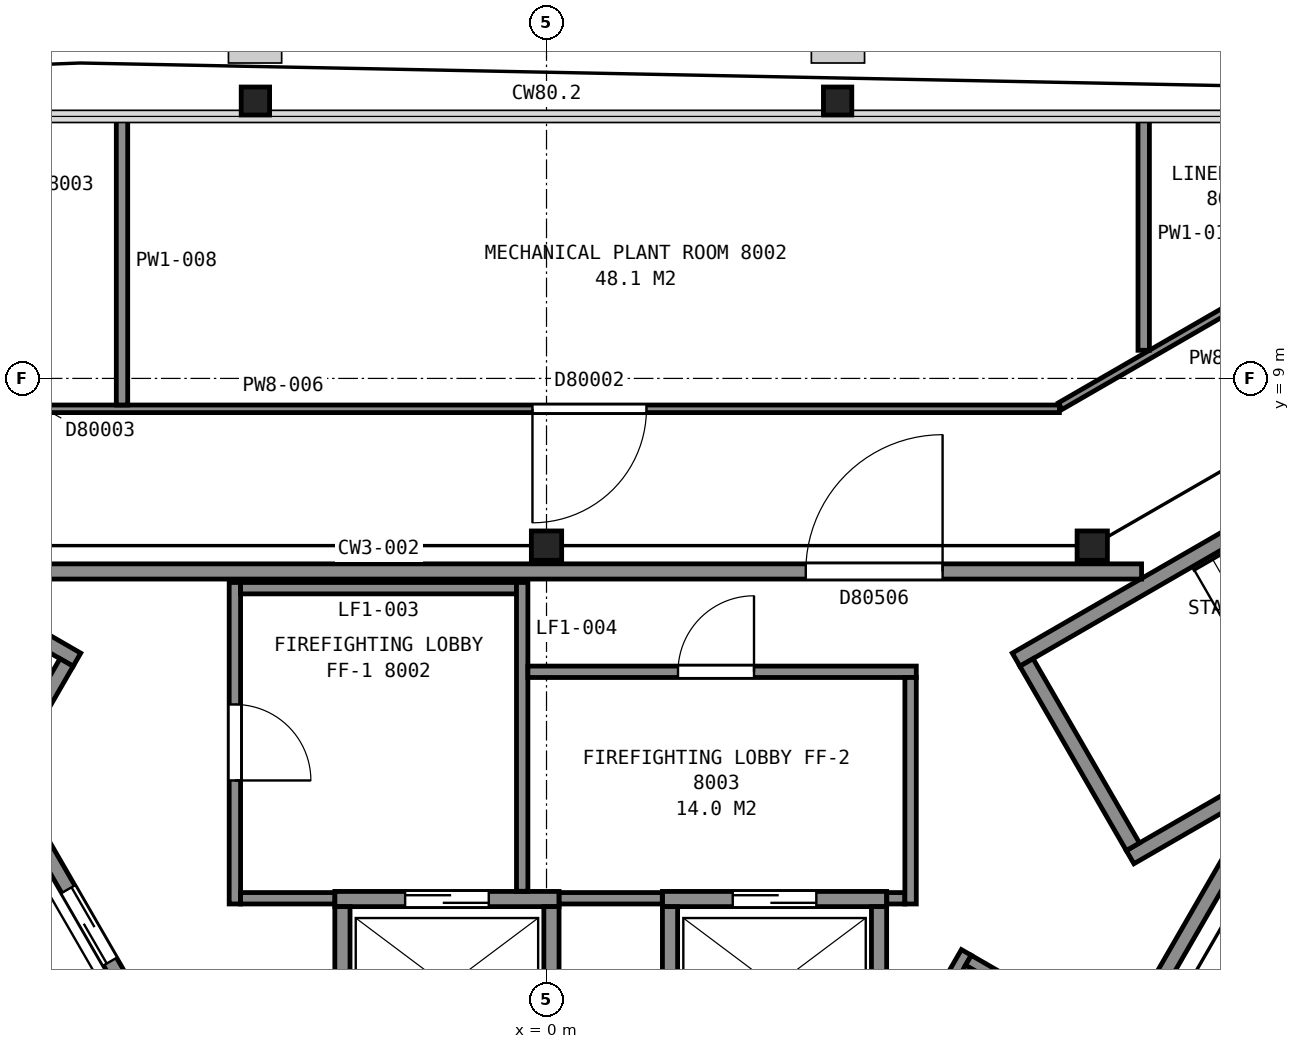
"""IFC4 building model, lengths in metres.
Left out: names, types, materials, properties, quantities, classifications, styles, units other than length and angle.
Written with IfcOpenShell. Run it as: python <this file> out.ifc"""

import sys

from ifc_helpers import new_model, si_unit, direction, frame, frame_2d, origin, origin_2d, place, context, subcontext, project, spatial, rectangle, i_section, extrude, element, fill, save


model = new_model("IFC4")
c1 = context("Model", 3, precision=1e-05, world=origin(), true_north=direction((0.0, 1.0)))
c2 = subcontext(c1, "Body", "Model", "MODEL_VIEW")
j1 = project(units=[si_unit("LENGTHUNIT", "METRE"), si_unit("PLANEANGLEUNIT", "RADIAN")], contexts=[c1])
p1 = place(None, origin())
s1 = spatial("IfcSite", under=j1, at=p1, CompositionType="ELEMENT")
p2 = place(p1, origin())
s2 = spatial("IfcBuilding", under=s1, at=p2, CompositionType="ELEMENT")
p3 = place(p2, frame((0.0, 0.0, 316.8)))
s3 = spatial("IfcBuildingStorey", under=s2, at=p3, CompositionType="ELEMENT", Elevation=316.8)
for number, where, z_axis, x_axis in (
    (1, (3.83, 12.65, 0.0), (0.0, 0.0, 1.0), (1.0, 0.0, 0.0)),
    (2, (-3.83, 12.65, 0.0), (0.0, 0.0, 1.0), (1.0, 0.0, 0.0)),
):
    element("IfcColumn", number, at=place(p3, frame(where, z_axis=z_axis, x_axis=x_axis)), inside=s3, PredefinedType="COLUMN", context=c2, shape_type="SweptSolid", body=[
        extrude(i_section(OverallWidth=0.373, OverallDepth=0.368, WebThickness=0.015, FlangeThickness=0.024, FilletRadius=0.015, at=origin_2d()), origin(), (0.0, 0.0, 1.0), 4.2),
    ])
for number, where, z_axis, x_axis in (
    (3, (7.18, 6.8, 0.0), (0.0, 0.0, 1.0), (1.0, 0.0, 0.0)),
    (4, (0.0, 6.8, 0.0), (0.0, 0.0, 1.0), (1.0, 0.0, 0.0)),
):
    element("IfcColumn", number, at=place(p3, frame(where, z_axis=z_axis, x_axis=x_axis)), inside=s3, PredefinedType="COLUMN", context=c2, shape_type="SweptSolid", body=[
        extrude(i_section(OverallWidth=0.399, OverallDepth=0.386, WebThickness=0.021, FlangeThickness=0.033, FilletRadius=0.015, at=origin_2d()), origin(), (0.0, 0.0, 1.0), 4.2),
    ])
for number, where, z_axis, x_axis in (
    (5, (6.178, 5.299, 0.0), (0.0, 0.0, 1.0), (0.866, 0.5, 0.0)),
    (6, (7.678, 2.701, 0.0), (0.0, 0.0, 1.0), (0.866, 0.5, 0.0)),
):
    element("IfcWall", number, at=place(p3, frame(where, z_axis=z_axis, x_axis=x_axis)), inside=s3, PredefinedType="PARTITIONING", context=c2, shape_type="SweptSolid", body=[
        extrude(rectangle(XDim=7.2, YDim=0.2, at=frame_2d((3.6, 0.0))), origin(), (0.0, 0.0, 1.0), 3.95),
    ])
p4 = place(p3, frame((7.715, 2.838, 0.0), z_axis=(0.0, 0.0, 1.0), x_axis=(-0.500049511043, 0.865996816683, 0.0)))
e7 = element("IfcWall", 7, at=p4, inside=s3, PredefinedType="PARTITIONING", context=c2, shape_type="SweptSolid", body=[
    extrude(rectangle(XDim=2.8, YDim=0.2, at=frame_2d((1.4, 0.0))), origin(), (0.0, 0.0, 1.0), 3.95),
])
p5 = place(p3, frame((-6.178, 5.299, 0.0), z_axis=(0.0, 0.0, 1.0), x_axis=(-0.866033125095, 0.499986626058, 0.0)))
e8 = element("IfcWall", 8, at=p5, inside=s3, PredefinedType="PARTITIONING", context=c2, shape_type="SweptSolid", body=[
    extrude(rectangle(XDim=7.2, YDim=0.2, at=frame_2d((3.6, 0.0))), origin(), (0.0, 0.0, 1.0), 3.95),
])
p6 = place(p3, frame((-6.315, 5.262, 0.0), z_axis=(0.0, 0.0, 1.0), x_axis=(-0.500049511043, -0.865996816683, 0.0)))
e9 = element("IfcWall", 9, at=p6, inside=s3, PredefinedType="PARTITIONING", context=c2, shape_type="SweptSolid", body=[
    extrude(rectangle(XDim=2.8, YDim=0.2, at=frame_2d((1.4, 0.0))), origin(), (0.0, 0.0, 1.0), 3.95),
])
p7 = place(p3, frame((-2.785, 2.15, 0.0), z_axis=(0.0, 0.0, 1.0), x_axis=(1.0, 0.0, 0.0)))
e10 = element("IfcWall", 10, at=p7, inside=s3, PredefinedType="PARTITIONING", context=c2, shape_type="SweptSolid", body=[
    extrude(rectangle(XDim=2.95, YDim=0.2, at=frame_2d((1.475, 0.0))), origin(), (0.0, 0.0, 1.0), 4.2),
])
p8 = place(p7, frame((0.925, 0.0, 0.0)))
e11 = element("IfcOpeningElement", 11, at=p8, cuts=e10, PredefinedType="OPENING", context=c2, shape_type="SweptSolid", body=[
    extrude(rectangle(XDim=1.1, YDim=2.1, at=frame_2d((0.55, 1.05))), frame((0.0, 0.11, 0.0), z_axis=(0.0, -1.0, 0.0), x_axis=(1.0, 0.0, 0.0)), (0.0, 0.0, 1.0), 0.22),
])
p9 = place(p3, frame((1.525, 2.15, 0.0), z_axis=(0.0, 0.0, 1.0), x_axis=(1.0, 0.0, 0.0)))
e12 = element("IfcWall", 12, at=p9, inside=s3, PredefinedType="PARTITIONING", context=c2, shape_type="SweptSolid", body=[
    extrude(rectangle(XDim=2.95, YDim=0.2, at=frame_2d((1.475, 0.0))), origin(), (0.0, 0.0, 1.0), 4.2),
])
p10 = place(p9, frame((0.925, 0.0, 0.0)))
e13 = element("IfcOpeningElement", 13, at=p10, cuts=e12, PredefinedType="OPENING", context=c2, shape_type="SweptSolid", body=[
    extrude(rectangle(XDim=1.1, YDim=2.1, at=frame_2d((0.55, 1.05))), frame((0.0, 0.11, 0.0), z_axis=(0.0, -1.0, 0.0), x_axis=(1.0, 0.0, 0.0)), (0.0, 0.0, 1.0), 0.22),
])
for number, where, z_axis, x_axis in (
    (14, (4.375, 0.1, 0.0), (0.0, 0.0, 1.0), (0.0, 1.0, 0.0)),
    (15, (1.625, 0.1, 0.0), (0.0, 0.0, 1.0), (0.0, 1.0, 0.0)),
    (16, (0.065, 0.1, 0.0), (0.0, 0.0, 1.0), (0.0, 1.0, 0.0)),
    (17, (-2.685, 0.1, 0.0), (0.0, 0.0, 1.0), (0.0, 1.0, 0.0)),
):
    element("IfcWall", number, at=place(p3, frame(where, z_axis=z_axis, x_axis=x_axis)), inside=s3, PredefinedType="PARTITIONING", context=c2, shape_type="SweptSolid", body=[
        extrude(rectangle(XDim=1.95, YDim=0.2, at=frame_2d((0.975, 0.0))), origin(), (0.0, 0.0, 1.0), 4.2),
    ])
p11 = place(p3, frame((-5.28, 0.525, 0.0), z_axis=(0.0, 0.0, 1.0), x_axis=(-0.500037662692, 0.866003658127, 0.0)))
e18 = element("IfcWall", 18, at=p11, inside=s3, PredefinedType="PARTITIONING", context=c2, shape_type="SweptSolid", body=[
    extrude(rectangle(XDim=2.95, YDim=0.2, at=frame_2d((1.475, 0.0))), origin(), (0.0, 0.0, 1.0), 4.2),
])
p12 = place(p11, frame((0.925, 0.0, 0.0)))
e19 = element("IfcOpeningElement", 19, at=p12, cuts=e18, PredefinedType="OPENING", context=c2, shape_type="SweptSolid", body=[
    extrude(rectangle(XDim=1.1, YDim=2.1, at=frame_2d((0.55, 1.05))), frame((0.0, 0.11, 0.0), z_axis=(0.0, -1.0, 0.0), x_axis=(1.0, 0.0, 0.0)), (0.0, 0.0, 1.0), 0.22),
])
p13 = place(p3, frame((7.829, 6.46, 0.0), z_axis=(0.0, 0.0, 1.0), x_axis=(-1.0, 0.0, 0.0)))
e20 = element("IfcWall", 20, at=p13, inside=s3, PredefinedType="PARTITIONING", context=c2, shape_type="SweptSolid", body=[
    extrude(rectangle(XDim=15.658, YDim=0.2, at=frame_2d((7.829, 0.0))), origin(), (0.0, 0.0, 1.0), 3.95),
])
p14 = place(p13, frame((2.618, 0.0, 0.0)))
e21 = element("IfcOpeningElement", 21, at=p14, cuts=e20, PredefinedType="OPENING", context=c2, shape_type="SweptSolid", body=[
    extrude(rectangle(XDim=1.8, YDim=2.1, at=frame_2d((0.9, 1.05))), frame((0.0, 0.11, 0.0), z_axis=(0.0, -1.0, 0.0), x_axis=(1.0, 0.0, 0.0)), (0.0, 0.0, 1.0), 0.22),
])
p15 = place(p3, frame((-4.1, 2.085, 0.0), z_axis=(0.0, 0.0, 1.0), x_axis=(0.0, 1.0, 0.0)))
e22 = element("IfcWall", 22, at=p15, inside=s3, PredefinedType="PARTITIONING", context=c2, shape_type="SweptSolid", body=[
    extrude(rectangle(XDim=4.23, YDim=0.15, at=frame_2d((2.115, 0.0))), origin(), (0.0, 0.0, 1.0), 3.95),
])
p16 = place(p15, frame((1.625, 0.0, 0.0)))
e23 = element("IfcOpeningElement", 23, at=p16, cuts=e22, PredefinedType="OPENING", context=c2, shape_type="SweptSolid", body=[
    extrude(rectangle(XDim=1.0, YDim=2.1, at=frame_2d((0.5, 1.05))), frame((0.0, 0.085, 0.0), z_axis=(0.0, -1.0, 0.0), x_axis=(1.0, 0.0, 0.0)), (0.0, 0.0, 1.0), 0.17),
])
p17 = place(p3, frame((-4.025, 2.16, 0.0), z_axis=(0.0, 0.0, 1.0), x_axis=(1.0, 0.0, 0.0)))
e24 = element("IfcWall", 24, at=p17, inside=s3, PredefinedType="PARTITIONING", context=c2, shape_type="SweptSolid", body=[
    extrude(rectangle(XDim=1.238, YDim=0.15, at=frame_2d((0.619, 0.0))), origin(), (0.0, 0.0, 1.0), 3.95),
])
p18 = place(p3, frame((-4.025, 6.24, 0.0), z_axis=(0.0, 0.0, 1.0), x_axis=(1.0, 0.0, 0.0)))
e25 = element("IfcWall", 25, at=p18, inside=s3, PredefinedType="PARTITIONING", context=c2, shape_type="SweptSolid", body=[
    extrude(rectangle(XDim=3.63, YDim=0.15, at=frame_2d((1.815, 0.0))), origin(), (0.0, 0.0, 1.0), 3.95),
])
p19 = place(p3, frame((-0.32, 2.252, 0.0), z_axis=(0.0, 0.0, 1.0), x_axis=(0.0, 1.0, 0.0)))
e26 = element("IfcWall", 26, at=p19, inside=s3, PredefinedType="PARTITIONING", context=c2, shape_type="SweptSolid", body=[
    extrude(rectangle(XDim=4.063, YDim=0.15, at=frame_2d((2.031, 0.0))), origin(), (0.0, 0.0, 1.0), 3.95),
])
p20 = place(p3, frame((-0.245, 5.14, 0.0), z_axis=(0.0, 0.0, 1.0), x_axis=(1.0, 0.0, 0.0)))
e27 = element("IfcWall", 27, at=p20, inside=s3, PredefinedType="PARTITIONING", context=c2, shape_type="SweptSolid", body=[
    extrude(rectangle(XDim=5.11, YDim=0.15, at=frame_2d((2.555, 0.0))), origin(), (0.0, 0.0, 1.0), 3.95),
])
p21 = place(p20, frame((1.975, 0.0, 0.0)))
e28 = element("IfcOpeningElement", 28, at=p21, cuts=e27, PredefinedType="OPENING", context=c2, shape_type="SweptSolid", body=[
    extrude(rectangle(XDim=1.0, YDim=2.1, at=frame_2d((0.5, 1.05))), frame((0.0, 0.085, 0.0), z_axis=(0.0, -1.0, 0.0), x_axis=(1.0, 0.0, 0.0)), (0.0, 0.0, 1.0), 0.17),
])
p22 = place(p3, frame((0.167, 2.16, 0.0), z_axis=(0.0, 0.0, 1.0), x_axis=(1.0, 0.0, 0.0)))
e29 = element("IfcWall", 29, at=p22, inside=s3, PredefinedType="PARTITIONING", context=c2, shape_type="SweptSolid", body=[
    extrude(rectangle(XDim=1.356, YDim=0.15, at=frame_2d((0.678, 0.0))), origin(), (0.0, 0.0, 1.0), 3.95),
])
p23 = place(p3, frame((2.552, -8.5, 0.0), z_axis=(0.0, 0.0, 1.0), x_axis=(0.499981156672, 0.866036282712, 0.0)))
e30 = element("IfcWall", 30, at=p23, inside=s3, PredefinedType="PARTITIONING", context=c2, shape_type="SweptSolid", body=[
    extrude(rectangle(XDim=13.915, YDim=0.2, at=frame_2d((6.957, 0.0))), origin(), (0.0, 0.0, 1.0), 3.95),
])
p24 = place(p3, frame((3.448, -2.147, 0.0), z_axis=(0.0, 0.0, 1.0), x_axis=(0.499992353047, 0.86602981871, 0.0)))
e31 = element("IfcWall", 31, at=p24, inside=s3, PredefinedType="PARTITIONING", context=c2, shape_type="SweptSolid", body=[
    extrude(rectangle(XDim=4.15, YDim=0.15, at=frame_2d((2.075, 0.0))), origin(), (0.0, 0.0, 1.0), 3.95),
])
p25 = place(p3, frame((4.477, 2.16, 0.0), z_axis=(0.0, 0.0, 1.0), x_axis=(1.0, 0.0, 0.0)))
e32 = element("IfcWall", 32, at=p25, inside=s3, PredefinedType="PARTITIONING", context=c2, shape_type="SweptSolid", body=[
    extrude(rectangle(XDim=0.238, YDim=0.15, at=frame_2d((0.119, 0.0))), origin(), (0.0, 0.0, 1.0), 3.95),
])
p26 = place(p3, frame((4.79, 2.085, 0.0), z_axis=(0.0, 0.0, 1.0), x_axis=(0.0, 1.0, 0.0)))
e33 = element("IfcWall", 33, at=p26, inside=s3, PredefinedType="PARTITIONING", context=c2, shape_type="SweptSolid", body=[
    extrude(rectangle(XDim=2.98, YDim=0.15, at=frame_2d((1.49, 0.0))), origin(), (0.0, 0.0, 1.0), 3.95),
])
p27 = place(p3, frame((7.477, 0.232, 0.0), z_axis=(0.0, 0.0, 1.0), x_axis=(-0.865944298464, 0.500140452231, 0.0)))
e34 = element("IfcWall", 34, at=p27, inside=s3, PredefinedType="PARTITIONING", context=c2, shape_type="SweptSolid", body=[
    extrude(rectangle(XDim=2.224, YDim=0.15, at=frame_2d((1.112, 0.0))), origin(), (0.0, 0.0, 1.0), 3.95),
])
p28 = place(p27, frame((0.65, 0.0, 0.0)))
e35 = element("IfcOpeningElement", 35, at=p28, cuts=e34, PredefinedType="OPENING", context=c2, shape_type="SweptSolid", body=[
    extrude(rectangle(XDim=0.9, YDim=2.1, at=frame_2d((0.45, 1.05))), frame((0.0, 0.085, 0.0), z_axis=(0.0, -1.0, 0.0), x_axis=(1.0, 0.0, 0.0)), (0.0, 0.0, 1.0), 0.17),
])
p29 = place(p3, frame((-4.075, -10.145, 0.0), z_axis=(0.0, 0.0, 1.0), x_axis=(-0.499912942625, 0.866075660549, 0.0)))
e36 = element("IfcWall", 36, at=p29, inside=s3, PredefinedType="PARTITIONING", context=c2, shape_type="SweptSolid", body=[
    extrude(rectangle(XDim=13.499, YDim=0.1, at=frame_2d((6.749, 0.0))), origin(), (0.0, 0.0, 1.0), 3.297),
])
p30 = place(p29, frame((4.117, 0.0, 0.0)))
e37 = element("IfcOpeningElement", 37, at=p30, cuts=e36, PredefinedType="OPENING", context=c2, shape_type="SweptSolid", body=[
    extrude(rectangle(XDim=1.5, YDim=2.1, at=frame_2d((0.75, 1.05))), frame((0.0, 0.06, 0.0), z_axis=(0.0, -1.0, 0.0), x_axis=(1.0, 0.0, 0.0)), (0.0, 0.0, 1.0), 0.12),
])
p31 = place(p3, frame((-6.748, 8.6, 0.0), z_axis=(0.0, 0.0, 1.0), x_axis=(1.0, 0.0, 0.0)))
e38 = element("IfcWall", 38, at=p31, inside=s3, PredefinedType="PARTITIONING", context=c2, shape_type="SweptSolid", body=[
    extrude(rectangle(XDim=13.496, YDim=0.1, at=frame_2d((6.748, 0.0))), origin(), (0.0, 0.0, 1.0), 3.297),
])
p32 = place(p31, frame((6.563, 0.0, 0.0)))
e39 = element("IfcOpeningElement", 39, at=p32, cuts=e38, PredefinedType="OPENING", context=c2, shape_type="SweptSolid", body=[
    extrude(rectangle(XDim=1.5, YDim=2.1, at=frame_2d((0.75, 1.05))), frame((0.0, 0.06, 0.0), z_axis=(0.0, -1.0, 0.0), x_axis=(1.0, 0.0, 0.0)), (0.0, 0.0, 1.0), 0.12),
])
p33 = place(p3, frame((-5.585, 8.65, 0.0), z_axis=(0.0, 0.0, 1.0), x_axis=(0.0, 1.0, 0.0)))
e40 = element("IfcWall", 40, at=p33, inside=s3, PredefinedType="PARTITIONING", context=c2, shape_type="SweptSolid", body=[
    extrude(rectangle(XDim=3.783, YDim=0.15, at=frame_2d((1.892, 0.0))), origin(), (0.0, 0.0, 1.0), 3.297),
])
p34 = place(p3, frame((4.075, -10.145, 0.0), z_axis=(0.0, 0.0, 1.0), x_axis=(0.499912942625, 0.866075660549, 0.0)))
e41 = element("IfcWall", 41, at=p34, inside=s3, PredefinedType="PARTITIONING", context=c2, shape_type="SweptSolid", body=[
    extrude(rectangle(XDim=13.499, YDim=0.1, at=frame_2d((6.749, 0.0))), origin(), (0.0, 0.0, 1.0), 3.297),
])
p35 = place(p3, frame((6.759, 8.635, 0.0), z_axis=(0.0, 0.0, 1.0), x_axis=(0.866073029218, 0.499917501255, 0.0)))
e42 = element("IfcWall", 42, at=p35, inside=s3, PredefinedType="PARTITIONING", context=c2, shape_type="SweptSolid", body=[
    extrude(rectangle(XDim=7.512, YDim=0.1, at=frame_2d((3.756, 0.0))), origin(), (0.0, 0.0, 1.0), 3.297),
])
p36 = place(p35, frame((3.868, 0.0, 0.0)))
e43 = element("IfcOpeningElement", 43, at=p36, cuts=e42, PredefinedType="OPENING", context=c2, shape_type="SweptSolid", body=[
    extrude(rectangle(XDim=0.9, YDim=2.1, at=frame_2d((0.45, 1.05))), frame((0.0, 0.06, 0.0), z_axis=(0.0, -1.0, 0.0), x_axis=(1.0, 0.0, 0.0)), (0.0, 0.0, 1.0), 0.12),
])
p37 = place(p3, frame((7.857, 9.37, 0.0), z_axis=(0.0, 0.0, 1.0), x_axis=(0.0, 1.0, 0.0)))
e44 = element("IfcWall", 44, at=p37, inside=s3, PredefinedType="PARTITIONING", context=c2, shape_type="SweptSolid", body=[
    extrude(rectangle(XDim=3.063, YDim=0.15, at=frame_2d((1.531, 0.0))), origin(), (0.0, 0.0, 1.0), 3.297),
])
p38 = place(p8, origin())
e45 = element("IfcDoor", 45, at=p38, inside=s3, OperationType="SLIDING_TO_LEFT", PredefinedType="DOOR", context=c2, shape_type="SweptSolid", body=[
    extrude(rectangle(XDim=1.1, YDim=2.1, at=frame_2d((0.55, 1.05))), frame((0.0, 0.025, 0.0), z_axis=(0.0, -1.0, 0.0), x_axis=(1.0, 0.0, 0.0)), (0.0, 0.0, 1.0), 0.05),
])
fill(e11, e45)
p39 = place(p10, origin())
e46 = element("IfcDoor", 46, at=p39, inside=s3, OperationType="SLIDING_TO_RIGHT", PredefinedType="DOOR", context=c2, shape_type="SweptSolid", body=[
    extrude(rectangle(XDim=1.1, YDim=2.1, at=frame_2d((0.55, 1.05))), frame((0.0, 0.025, 0.0), z_axis=(0.0, -1.0, 0.0), x_axis=(1.0, 0.0, 0.0)), (0.0, 0.0, 1.0), 0.05),
])
fill(e13, e46)
p40 = place(p12, origin())
e47 = element("IfcDoor", 47, at=p40, inside=s3, OperationType="SLIDING_TO_LEFT", PredefinedType="DOOR", context=c2, shape_type="SweptSolid", body=[
    extrude(rectangle(XDim=1.1, YDim=2.1, at=frame_2d((0.55, 1.05))), frame((0.0, 0.025, 0.0), z_axis=(0.0, -1.0, 0.0), x_axis=(1.0, 0.0, 0.0)), (0.0, 0.0, 1.0), 0.05),
])
fill(e19, e47)
p41 = place(p14, origin())
e48 = element("IfcDoor", 48, at=p41, inside=s3, OperationType="DOUBLE_DOOR_SINGLE_SWING", PredefinedType="DOOR", context=c2, shape_type="SweptSolid", body=[
    extrude(rectangle(XDim=1.8, YDim=2.1, at=frame_2d((0.9, 1.05))), frame((0.0, 0.025, 0.0), z_axis=(0.0, -1.0, 0.0), x_axis=(1.0, 0.0, 0.0)), (0.0, 0.0, 1.0), 0.05),
])
fill(e21, e48)
p42 = place(p16, origin())
e49 = element("IfcDoor", 49, at=p42, inside=s3, OperationType="SINGLE_SWING_LEFT", PredefinedType="DOOR", context=c2, shape_type="SweptSolid", body=[
    extrude(rectangle(XDim=1.0, YDim=2.1, at=frame_2d((0.5, 1.05))), frame((0.0, 0.025, 0.0), z_axis=(0.0, -1.0, 0.0), x_axis=(1.0, 0.0, 0.0)), (0.0, 0.0, 1.0), 0.05),
])
fill(e23, e49)
p43 = place(p21, origin())
e50 = element("IfcDoor", 50, at=p43, inside=s3, OperationType="SINGLE_SWING_RIGHT", PredefinedType="DOOR", context=c2, shape_type="SweptSolid", body=[
    extrude(rectangle(XDim=1.0, YDim=2.1, at=frame_2d((0.5, 1.05))), frame((0.0, 0.025, 0.0), z_axis=(0.0, -1.0, 0.0), x_axis=(1.0, 0.0, 0.0)), (0.0, 0.0, 1.0), 0.05),
])
fill(e28, e50)
p44 = place(p32, origin())
e51 = element("IfcDoor", 51, at=p44, inside=s3, OperationType="DOUBLE_DOOR_SINGLE_SWING", PredefinedType="DOOR", context=c2, shape_type="SweptSolid", body=[
    extrude(rectangle(XDim=1.5, YDim=2.1, at=frame_2d((0.75, 1.05))), frame((0.0, 0.025, 0.0), z_axis=(0.0, -1.0, 0.0), x_axis=(1.0, 0.0, 0.0)), (0.0, 0.0, 1.0), 0.05),
])
fill(e39, e51)
save(model, sys.argv[1])
